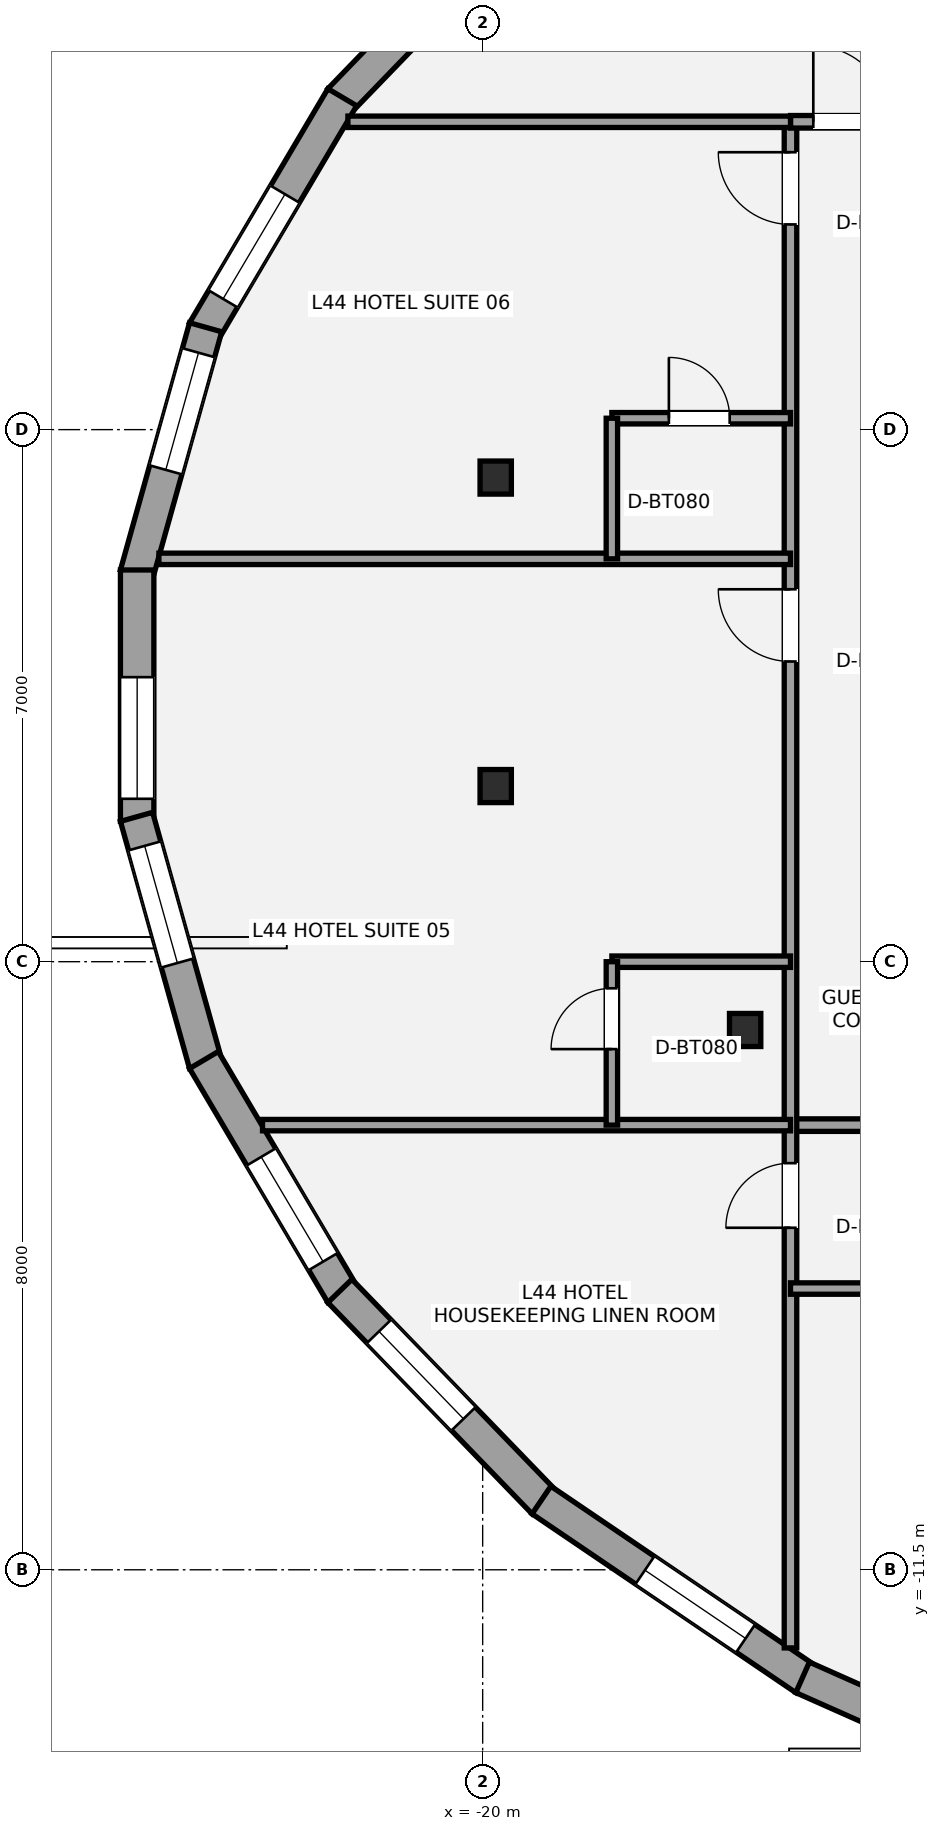
"""IFC4 building model, lengths in metres.
Left out: names, types, materials, properties, quantities, classifications, styles, units other than length and angle.
Written with IfcOpenShell. Run it as: python <this file> out.ifc"""

import sys

from ifc_helpers import new_model, si_unit, direction, frame, frame_2d, origin, origin_2d, place, context, subcontext, project, spatial, rectangle, i_section, extrude, element, fill, save


model = new_model("IFC4")
c1 = context("Model", 3, precision=1e-05, world=origin(), true_north=direction((0.0, 1.0)))
c2 = subcontext(c1, "Body", "Model", "MODEL_VIEW")
j1 = project(units=[si_unit("LENGTHUNIT", "METRE"), si_unit("PLANEANGLEUNIT", "RADIAN")], contexts=[c1])
p1 = place(None, origin())
s1 = spatial("IfcSite", under=j1, at=p1, CompositionType="ELEMENT")
p2 = place(p1, origin())
s2 = spatial("IfcBuilding", under=s1, at=p2, CompositionType="ELEMENT")
p3 = place(p2, frame((0.0, 0.0, 163.0)))
s3 = spatial("IfcBuildingStorey", under=s2, at=p3, CompositionType="ELEMENT", Elevation=163.0)
for number, where, z_axis, x_axis in (
    (1, (-19.828, 2.869, 0.0), (0.0, 0.0, 1.0), (1.0, 0.0, 0.0)),
    (2, (-19.828, -1.189, 0.0), (0.0, 0.0, 1.0), (1.0, 0.0, 0.0)),
    (3, (-16.547, -4.398, 0.0), (0.0, 0.0, 1.0), (1.0, 0.0, 0.0)),
):
    element("IfcColumn", number, at=place(p3, frame(where, z_axis=z_axis, x_axis=x_axis)), inside=s3, PredefinedType="COLUMN", context=c2, shape_type="SweptSolid", body=[
        extrude(i_section(OverallWidth=0.412, OverallDepth=0.435, WebThickness=0.036, FlangeThickness=0.057, at=origin_2d()), origin(), (0.0, 0.0, 1.0), 3.2),
    ])
p4 = place(p3, frame((-21.879, 7.832, 0.0), z_axis=(0.0, 0.0, 1.0), x_axis=(0.694975307772, 0.719033602544, 0.0)))
e4 = element("IfcWall", 4, at=p4, inside=s3, PredefinedType="STANDARD", context=c2, shape_type="SweptSolid", body=[
    extrude(rectangle(XDim=3.866, YDim=0.44, at=frame_2d((1.933, 0.0))), origin(), (0.0, 0.0, 1.0), 2.315),
])
p5 = place(p4, frame((1.526, 0.0, 0.58)))
e5 = element("IfcOpeningElement", 5, at=p5, cuts=e4, PredefinedType="OPENING", context=c2, shape_type="SweptSolid", body=[
    extrude(rectangle(XDim=1.6, YDim=1.55, at=frame_2d((0.8, 0.775))), frame((0.0, 0.23, 0.0), z_axis=(0.0, -1.0, 0.0), x_axis=(1.0, 0.0, 0.0)), (0.0, 0.0, 1.0), 0.46),
])
p6 = place(p3, frame((-23.667, 4.794, 0.0), z_axis=(0.0, 0.0, 1.0), x_axis=(0.508883387051, 0.860835465338, 0.0)))
e6 = element("IfcWall", 6, at=p6, inside=s3, PredefinedType="STANDARD", context=c2, shape_type="SweptSolid", body=[
    extrude(rectangle(XDim=3.577, YDim=0.44, at=frame_2d((1.788, 0.0))), origin(), (0.0, 0.0, 1.0), 2.315),
])
p7 = place(p6, frame((0.496, 0.0, 0.58)))
e7 = element("IfcOpeningElement", 7, at=p7, cuts=e6, PredefinedType="OPENING", context=c2, shape_type="SweptSolid", body=[
    extrude(rectangle(XDim=1.6, YDim=1.55, at=frame_2d((0.8, 0.775))), frame((0.0, 0.23, 0.0), z_axis=(0.0, -1.0, 0.0), x_axis=(1.0, 0.0, 0.0)), (0.0, 0.0, 1.0), 0.46),
])
p8 = place(p3, frame((-24.554, 1.594, 0.0), z_axis=(0.0, 0.0, 1.0), x_axis=(0.269235699479, 0.963074315993, 0.0)))
e8 = element("IfcWall", 8, at=p8, inside=s3, PredefinedType="STANDARD", context=c2, shape_type="SweptSolid", body=[
    extrude(rectangle(XDim=3.377, YDim=0.44, at=frame_2d((1.688, 0.0))), origin(), (0.0, 0.0, 1.0), 2.315),
])
p9 = place(p8, frame((1.429, 0.0, 0.58)))
e9 = element("IfcOpeningElement", 9, at=p9, cuts=e8, PredefinedType="OPENING", context=c2, shape_type="SweptSolid", body=[
    extrude(rectangle(XDim=1.6, YDim=1.55, at=frame_2d((0.8, 0.775))), frame((0.0, 0.23, 0.0), z_axis=(0.0, -1.0, 0.0), x_axis=(1.0, 0.0, 0.0)), (0.0, 0.0, 1.0), 0.46),
])
p10 = place(p3, frame((-24.546, -1.654, 0.0), z_axis=(0.0, 0.0, 1.0), x_axis=(0.0, 1.0, 0.0)))
e10 = element("IfcWall", 10, at=p10, inside=s3, PredefinedType="STANDARD", context=c2, shape_type="SweptSolid", body=[
    extrude(rectangle(XDim=3.307, YDim=0.44, at=frame_2d((1.654, 0.0))), origin(), (0.0, 0.0, 1.0), 2.315),
])
p11 = place(p10, frame((0.297, 0.0, 0.58)))
e11 = element("IfcOpeningElement", 11, at=p11, cuts=e10, PredefinedType="OPENING", context=c2, shape_type="SweptSolid", body=[
    extrude(rectangle(XDim=1.6, YDim=1.55, at=frame_2d((0.8, 0.775))), frame((0.0, 0.23, 0.0), z_axis=(0.0, -1.0, 0.0), x_axis=(1.0, 0.0, 0.0)), (0.0, 0.0, 1.0), 0.46),
])
p12 = place(p3, frame((-23.645, -4.846, 0.0), z_axis=(0.0, 0.0, 1.0), x_axis=(-0.269235699479, 0.963074315993, 0.0)))
e12 = element("IfcWall", 12, at=p12, inside=s3, PredefinedType="STANDARD", context=c2, shape_type="SweptSolid", body=[
    extrude(rectangle(XDim=3.377, YDim=0.44, at=frame_2d((1.688, 0.0))), origin(), (0.0, 0.0, 1.0), 2.315),
])
p13 = place(p12, frame((1.38, 0.0, 0.58)))
e13 = element("IfcOpeningElement", 13, at=p13, cuts=e12, PredefinedType="OPENING", context=c2, shape_type="SweptSolid", body=[
    extrude(rectangle(XDim=1.6, YDim=1.55, at=frame_2d((0.8, 0.775))), frame((0.0, 0.23, 0.0), z_axis=(0.0, -1.0, 0.0), x_axis=(1.0, 0.0, 0.0)), (0.0, 0.0, 1.0), 0.46),
])
p14 = place(p3, frame((-21.847, -7.873, 0.0), z_axis=(0.0, 0.0, 1.0), x_axis=(-0.508883387051, 0.860835465338, 0.0)))
e14 = element("IfcWall", 14, at=p14, inside=s3, PredefinedType="STANDARD", context=c2, shape_type="SweptSolid", body=[
    extrude(rectangle(XDim=3.577, YDim=0.44, at=frame_2d((1.788, 0.0))), origin(), (0.0, 0.0, 1.0), 2.315),
])
p15 = place(p14, frame((0.496, 0.0, 0.58)))
e15 = element("IfcOpeningElement", 15, at=p15, cuts=e14, PredefinedType="OPENING", context=c2, shape_type="SweptSolid", body=[
    extrude(rectangle(XDim=1.6, YDim=1.55, at=frame_2d((0.8, 0.775))), frame((0.0, 0.23, 0.0), z_axis=(0.0, -1.0, 0.0), x_axis=(1.0, 0.0, 0.0)), (0.0, 0.0, 1.0), 0.46),
])
p16 = place(p3, frame((-19.192, -10.612, 0.0), z_axis=(0.0, 0.0, 1.0), x_axis=(-0.694975307772, 0.719033602544, 0.0)))
e16 = element("IfcWall", 16, at=p16, inside=s3, PredefinedType="STANDARD", context=c2, shape_type="SweptSolid", body=[
    extrude(rectangle(XDim=3.866, YDim=0.44, at=frame_2d((1.933, 0.0))), origin(), (0.0, 0.0, 1.0), 2.315),
])
p17 = place(p16, frame((1.526, 0.0, 0.58)))
e17 = element("IfcOpeningElement", 17, at=p17, cuts=e16, PredefinedType="OPENING", context=c2, shape_type="SweptSolid", body=[
    extrude(rectangle(XDim=1.6, YDim=1.55, at=frame_2d((0.8, 0.775))), frame((0.0, 0.23, 0.0), z_axis=(0.0, -1.0, 0.0), x_axis=(1.0, 0.0, 0.0)), (0.0, 0.0, 1.0), 0.46),
])
p18 = place(p3, frame((-15.757, -12.935, 0.0), z_axis=(0.0, 0.0, 1.0), x_axis=(-0.827760762475, 0.561081206338, 0.0)))
e18 = element("IfcWall", 18, at=p18, inside=s3, PredefinedType="STANDARD", context=c2, shape_type="SweptSolid", body=[
    extrude(rectangle(XDim=4.192, YDim=0.44, at=frame_2d((2.096, 0.0))), origin(), (0.0, 0.0, 1.0), 2.315),
])
p19 = place(p18, frame((0.947, 0.0, 0.58)))
e19 = element("IfcOpeningElement", 19, at=p19, cuts=e18, PredefinedType="OPENING", context=c2, shape_type="SweptSolid", body=[
    extrude(rectangle(XDim=1.6, YDim=1.55, at=frame_2d((0.8, 0.775))), frame((0.0, 0.23, 0.0), z_axis=(0.0, -1.0, 0.0), x_axis=(1.0, 0.0, 0.0)), (0.0, 0.0, 1.0), 0.46),
])
p20 = place(p3, frame((-11.69, -14.737, 0.0), z_axis=(0.0, 0.0, 1.0), x_axis=(-0.913907994914, 0.405921392431, 0.0)))
e20 = element("IfcWall", 20, at=p20, inside=s3, PredefinedType="STANDARD", context=c2, shape_type="SweptSolid", body=[
    extrude(rectangle(XDim=4.487, YDim=0.44, at=frame_2d((2.244, 0.0))), origin(), (0.0, 0.0, 1.0), 2.315),
])
p21 = place(p20, frame((1.692, 0.0, 0.58)))
e21 = element("IfcOpeningElement", 21, at=p21, cuts=e20, PredefinedType="OPENING", context=c2, shape_type="SweptSolid", body=[
    extrude(rectangle(XDim=1.6, YDim=1.55, at=frame_2d((0.8, 0.775))), frame((0.0, 0.23, 0.0), z_axis=(0.0, -1.0, 0.0), x_axis=(1.0, 0.0, 0.0)), (0.0, 0.0, 1.0), 0.46),
])
p22 = place(p3, frame((-15.95, -5.65, 0.0), z_axis=(0.0, 0.0, 1.0), x_axis=(1.0, 0.0, 0.0)))
e22 = element("IfcWall", 22, at=p22, inside=s3, PredefinedType="PARTITIONING", context=c2, shape_type="SweptSolid", body=[
    extrude(rectangle(XDim=31.5, YDim=0.165, at=frame_2d((15.75, 0.0))), origin(), (0.0, 0.0, 1.0), 2.398),
])
p23 = place(p22, frame((4.8, 0.0, 0.0)))
e23 = element("IfcOpeningElement", 23, at=p23, cuts=e22, PredefinedType="OPENING", context=c2, shape_type="SweptSolid", body=[
    extrude(rectangle(XDim=0.95, YDim=2.15, at=frame_2d((0.475, 1.075))), frame((0.0, 0.093, 0.0), z_axis=(0.0, -1.0, 0.0), x_axis=(1.0, 0.0, 0.0)), (0.0, 0.0, 1.0), 0.185),
])
p24 = place(p22, frame((12.8, 0.0, 0.0)))
e24 = element("IfcOpeningElement", 24, at=p24, cuts=e22, PredefinedType="OPENING", context=c2, shape_type="SweptSolid", body=[
    extrude(rectangle(XDim=0.95, YDim=2.15, at=frame_2d((0.475, 1.075))), frame((0.0, 0.093, 0.0), z_axis=(0.0, -1.0, 0.0), x_axis=(1.0, 0.0, 0.0)), (0.0, 0.0, 1.0), 0.185),
])
p25 = place(p22, frame((20.8, 0.0, 0.0)))
e25 = element("IfcOpeningElement", 25, at=p25, cuts=e22, PredefinedType="OPENING", context=c2, shape_type="SweptSolid", body=[
    extrude(rectangle(XDim=0.95, YDim=2.15, at=frame_2d((0.475, 1.075))), frame((0.0, 0.093, 0.0), z_axis=(0.0, -1.0, 0.0), x_axis=(1.0, 0.0, 0.0)), (0.0, 0.0, 1.0), 0.185),
])
p26 = place(p22, frame((30.15, 0.0, 0.0)))
e26 = element("IfcOpeningElement", 26, at=p26, cuts=e22, PredefinedType="OPENING", context=c2, shape_type="SweptSolid", body=[
    extrude(rectangle(XDim=0.95, YDim=2.15, at=frame_2d((0.475, 1.075))), frame((0.0, 0.093, 0.0), z_axis=(0.0, -1.0, 0.0), x_axis=(1.0, 0.0, 0.0)), (0.0, 0.0, 1.0), 0.185),
])
p27 = place(p3, frame((-15.95, -12.528, 0.0), z_axis=(0.0, 0.0, 1.0), x_axis=(0.0, 1.0, 0.0)))
e27 = element("IfcWall", 27, at=p27, inside=s3, PredefinedType="PARTITIONING", context=c2, shape_type="SweptSolid", body=[
    extrude(rectangle(XDim=20.078, YDim=0.165, at=frame_2d((10.039, 0.0))), origin(), (0.0, 0.0, 1.0), 2.473),
])
p28 = place(p27, frame((5.528, 0.0, 0.0)))
e28 = element("IfcOpeningElement", 28, at=p28, cuts=e27, PredefinedType="OPENING", context=c2, shape_type="SweptSolid", body=[
    extrude(rectangle(XDim=0.85, YDim=2.1, at=frame_2d((0.425, 1.05))), frame((0.0, 0.093, 0.0), z_axis=(0.0, -1.0, 0.0), x_axis=(1.0, 0.0, 0.0)), (0.0, 0.0, 1.0), 0.185),
])
p29 = place(p27, frame((12.978, 0.0, 0.0)))
e29 = element("IfcOpeningElement", 29, at=p29, cuts=e27, PredefinedType="OPENING", context=c2, shape_type="SweptSolid", body=[
    extrude(rectangle(XDim=0.95, YDim=2.15, at=frame_2d((0.475, 1.075))), frame((0.0, 0.093, 0.0), z_axis=(0.0, -1.0, 0.0), x_axis=(1.0, 0.0, 0.0)), (0.0, 0.0, 1.0), 0.185),
])
p30 = place(p27, frame((18.728, 0.0, 0.0)))
e30 = element("IfcOpeningElement", 30, at=p30, cuts=e27, PredefinedType="OPENING", context=c2, shape_type="SweptSolid", body=[
    extrude(rectangle(XDim=0.95, YDim=2.15, at=frame_2d((0.475, 1.075))), frame((0.0, 0.093, 0.0), z_axis=(0.0, -1.0, 0.0), x_axis=(1.0, 0.0, 0.0)), (0.0, 0.0, 1.0), 0.185),
])
p31 = place(p3, frame((-15.95, 7.55, 0.0), z_axis=(0.0, 0.0, 1.0), x_axis=(1.0, 0.0, 0.0)))
e31 = element("IfcWall", 31, at=p31, inside=s3, PredefinedType="PARTITIONING", context=c2, shape_type="SweptSolid", body=[
    extrude(rectangle(XDim=2.15, YDim=0.165, at=frame_2d((1.075, 0.0))), origin(), (0.0, 0.0, 1.0), 3.02),
])
p32 = place(p31, frame((0.3, 0.0, 0.0)))
e32 = element("IfcOpeningElement", 32, at=p32, cuts=e31, PredefinedType="OPENING", context=c2, shape_type="SweptSolid", body=[
    extrude(rectangle(XDim=1.0, YDim=2.15, at=frame_2d((0.5, 1.075))), frame((0.0, 0.093, 0.0), z_axis=(0.0, -1.0, 0.0), x_axis=(1.0, 0.0, 0.0)), (0.0, 0.0, 1.0), 0.185),
])
p33 = place(p3, frame((-21.773, 7.55, 0.0), z_axis=(0.0, 0.0, 1.0), x_axis=(1.0, 0.0, 0.0)))
e33 = element("IfcWall", 33, at=p33, inside=s3, PredefinedType="PLUMBINGWALL", context=c2, shape_type="SweptSolid", body=[
    extrude(rectangle(XDim=5.823, YDim=0.15, at=frame_2d((2.912, 0.0))), origin(), (0.0, 0.0, 1.0), 2.473),
])
p34 = place(p3, frame((-22.896, -5.65, 0.0), z_axis=(0.0, 0.0, 1.0), x_axis=(1.0, 0.0, 0.0)))
e34 = element("IfcWall", 34, at=p34, inside=s3, PredefinedType="PLUMBINGWALL", context=c2, shape_type="SweptSolid", body=[
    extrude(rectangle(XDim=6.947, YDim=0.15, at=frame_2d((3.473, 0.0))), origin(), (0.0, 0.0, 1.0), 2.473),
])
p35 = place(p3, frame((-15.95, -7.8, 0.0), z_axis=(0.0, 0.0, 1.0), x_axis=(1.0, 0.0, 0.0)))
e35 = element("IfcWall", 35, at=p35, inside=s3, PredefinedType="PLUMBINGWALL", context=c2, shape_type="SweptSolid", body=[
    extrude(rectangle(XDim=1.85, YDim=0.15, at=frame_2d((0.925, 0.0))), origin(), (0.0, 0.0, 1.0), 3.02),
])
p36 = place(p3, frame((-24.26, 1.8, 0.0), z_axis=(0.0, 0.0, 1.0), x_axis=(1.0, 0.0, 0.0)))
e36 = element("IfcWall", 36, at=p36, inside=s3, PredefinedType="PLUMBINGWALL", context=c2, shape_type="SweptSolid", body=[
    extrude(rectangle(XDim=8.31, YDim=0.15, at=frame_2d((4.155, 0.0))), origin(), (0.0, 0.0, 1.0), 2.473),
])
p37 = place(p3, frame((-18.3, -3.5, 0.0), z_axis=(0.0, 0.0, 1.0), x_axis=(1.0, 0.0, 0.0)))
e37 = element("IfcWall", 37, at=p37, inside=s3, PredefinedType="PLUMBINGWALL", context=c2, shape_type="SweptSolid", body=[
    extrude(rectangle(XDim=2.35, YDim=0.15, at=frame_2d((1.175, 0.0))), origin(), (0.0, 0.0, 1.0), 2.398),
])
p38 = place(p3, frame((-18.3, -5.65, 0.0), z_axis=(0.0, 0.0, 1.0), x_axis=(0.0, 1.0, 0.0)))
e38 = element("IfcWall", 38, at=p38, inside=s3, PredefinedType="PLUMBINGWALL", context=c2, shape_type="SweptSolid", body=[
    extrude(rectangle(XDim=2.15, YDim=0.15, at=frame_2d((1.075, 0.0))), origin(), (0.0, 0.0, 1.0), 2.473),
])
p39 = place(p38, frame((1.0, 0.0, 0.0)))
e39 = element("IfcOpeningElement", 39, at=p39, cuts=e38, PredefinedType="OPENING", context=c2, shape_type="SweptSolid", body=[
    extrude(rectangle(XDim=0.8, YDim=2.1, at=frame_2d((0.4, 1.05))), frame((0.0, 0.085, 0.0), z_axis=(0.0, -1.0, 0.0), x_axis=(1.0, 0.0, 0.0)), (0.0, 0.0, 1.0), 0.17),
])
p40 = place(p3, frame((-18.3, 3.65, 0.0), z_axis=(0.0, 0.0, 1.0), x_axis=(1.0, 0.0, 0.0)))
e40 = element("IfcWall", 40, at=p40, inside=s3, PredefinedType="PLUMBINGWALL", context=c2, shape_type="SweptSolid", body=[
    extrude(rectangle(XDim=2.35, YDim=0.15, at=frame_2d((1.175, 0.0))), origin(), (0.0, 0.0, 1.0), 3.02),
])
p41 = place(p40, frame((0.75, 0.0, 0.0)))
e41 = element("IfcOpeningElement", 41, at=p41, cuts=e40, PredefinedType="OPENING", context=c2, shape_type="SweptSolid", body=[
    extrude(rectangle(XDim=0.8, YDim=2.1, at=frame_2d((0.4, 1.05))), frame((0.0, 0.085, 0.0), z_axis=(0.0, -1.0, 0.0), x_axis=(1.0, 0.0, 0.0)), (0.0, 0.0, 1.0), 0.17),
])
p42 = place(p3, frame((-18.3, 1.8, 0.0), z_axis=(0.0, 0.0, 1.0), x_axis=(0.0, 1.0, 0.0)))
e42 = element("IfcWall", 42, at=p42, inside=s3, PredefinedType="PLUMBINGWALL", context=c2, shape_type="SweptSolid", body=[
    extrude(rectangle(XDim=1.85, YDim=0.15, at=frame_2d((0.925, 0.0))), origin(), (0.0, 0.0, 1.0), 3.02),
])
p43 = place(p7, origin())
e43 = element("IfcWindow", 43, at=p43, inside=s3, PartitioningType="SINGLE_PANEL", PredefinedType="WINDOW", context=c2, shape_type="SweptSolid", body=[
    extrude(rectangle(XDim=1.6, YDim=1.55, at=frame_2d((0.8, 0.775))), frame((0.0, -0.01, 0.0), z_axis=(0.0, -1.0, 0.0), x_axis=(1.0, 0.0, 0.0)), (0.0, 0.0, 1.0), 0.06),
])
fill(e7, e43)
p44 = place(p9, origin())
e44 = element("IfcWindow", 44, at=p44, inside=s3, PartitioningType="SINGLE_PANEL", PredefinedType="WINDOW", context=c2, shape_type="SweptSolid", body=[
    extrude(rectangle(XDim=1.6, YDim=1.55, at=frame_2d((0.8, 0.775))), frame((0.0, -0.01, 0.0), z_axis=(0.0, -1.0, 0.0), x_axis=(1.0, 0.0, 0.0)), (0.0, 0.0, 1.0), 0.06),
])
fill(e9, e44)
p45 = place(p11, origin())
e45 = element("IfcWindow", 45, at=p45, inside=s3, PartitioningType="SINGLE_PANEL", PredefinedType="WINDOW", context=c2, shape_type="SweptSolid", body=[
    extrude(rectangle(XDim=1.6, YDim=1.55, at=frame_2d((0.8, 0.775))), frame((0.0, -0.01, 0.0), z_axis=(0.0, -1.0, 0.0), x_axis=(1.0, 0.0, 0.0)), (0.0, 0.0, 1.0), 0.06),
])
fill(e11, e45)
p46 = place(p13, origin())
e46 = element("IfcWindow", 46, at=p46, inside=s3, PartitioningType="SINGLE_PANEL", PredefinedType="WINDOW", context=c2, shape_type="SweptSolid", body=[
    extrude(rectangle(XDim=1.6, YDim=1.55, at=frame_2d((0.8, 0.775))), frame((0.0, -0.01, 0.0), z_axis=(0.0, -1.0, 0.0), x_axis=(1.0, 0.0, 0.0)), (0.0, 0.0, 1.0), 0.06),
])
fill(e13, e46)
p47 = place(p15, origin())
e47 = element("IfcWindow", 47, at=p47, inside=s3, PartitioningType="SINGLE_PANEL", PredefinedType="WINDOW", context=c2, shape_type="SweptSolid", body=[
    extrude(rectangle(XDim=1.6, YDim=1.55, at=frame_2d((0.8, 0.775))), frame((0.0, -0.01, 0.0), z_axis=(0.0, -1.0, 0.0), x_axis=(1.0, 0.0, 0.0)), (0.0, 0.0, 1.0), 0.06),
])
fill(e15, e47)
p48 = place(p17, origin())
e48 = element("IfcWindow", 48, at=p48, inside=s3, PartitioningType="SINGLE_PANEL", PredefinedType="WINDOW", context=c2, shape_type="SweptSolid", body=[
    extrude(rectangle(XDim=1.6, YDim=1.55, at=frame_2d((0.8, 0.775))), frame((0.0, -0.01, 0.0), z_axis=(0.0, -1.0, 0.0), x_axis=(1.0, 0.0, 0.0)), (0.0, 0.0, 1.0), 0.06),
])
fill(e17, e48)
p49 = place(p19, origin())
e49 = element("IfcWindow", 49, at=p49, inside=s3, PartitioningType="SINGLE_PANEL", PredefinedType="WINDOW", context=c2, shape_type="SweptSolid", body=[
    extrude(rectangle(XDim=1.6, YDim=1.55, at=frame_2d((0.8, 0.775))), frame((0.0, -0.01, 0.0), z_axis=(0.0, -1.0, 0.0), x_axis=(1.0, 0.0, 0.0)), (0.0, 0.0, 1.0), 0.06),
])
fill(e19, e49)
p50 = place(p32, origin())
e50 = element("IfcDoor", 50, at=p50, inside=s3, OperationType="SINGLE_SWING_LEFT", PredefinedType="DOOR", context=c2, shape_type="SweptSolid", body=[
    extrude(rectangle(XDim=1.0, YDim=2.15, at=frame_2d((0.5, 1.075))), frame((0.0, 0.025, 0.0), z_axis=(0.0, -1.0, 0.0), x_axis=(1.0, 0.0, 0.0)), (0.0, 0.0, 1.0), 0.05),
])
fill(e32, e50)
p51 = place(p28, origin())
e51 = element("IfcDoor", 51, at=p51, inside=s3, OperationType="SINGLE_SWING_LEFT", PredefinedType="DOOR", context=c2, shape_type="SweptSolid", body=[
    extrude(rectangle(XDim=0.85, YDim=2.1, at=frame_2d((0.425, 1.05))), frame((0.0, 0.025, 0.0), z_axis=(0.0, -1.0, 0.0), x_axis=(1.0, 0.0, 0.0)), (0.0, 0.0, 1.0), 0.05),
])
fill(e28, e51)
p52 = place(p29, origin())
e52 = element("IfcDoor", 52, at=p52, inside=s3, OperationType="SINGLE_SWING_RIGHT", PredefinedType="DOOR", context=c2, shape_type="SweptSolid", body=[
    extrude(rectangle(XDim=0.95, YDim=2.15, at=frame_2d((0.475, 1.075))), frame((0.0, 0.025, 0.0), z_axis=(0.0, -1.0, 0.0), x_axis=(1.0, 0.0, 0.0)), (0.0, 0.0, 1.0), 0.05),
])
fill(e29, e52)
p53 = place(p39, origin())
e53 = element("IfcDoor", 53, at=p53, inside=s3, OperationType="SINGLE_SWING_LEFT", PredefinedType="DOOR", context=c2, shape_type="SweptSolid", body=[
    extrude(rectangle(XDim=0.8, YDim=2.1, at=frame_2d((0.4, 1.05))), frame((0.0, 0.025, 0.0), z_axis=(0.0, -1.0, 0.0), x_axis=(1.0, 0.0, 0.0)), (0.0, 0.0, 1.0), 0.05),
])
fill(e39, e53)
p54 = place(p30, origin())
e54 = element("IfcDoor", 54, at=p54, inside=s3, OperationType="SINGLE_SWING_RIGHT", PredefinedType="DOOR", context=c2, shape_type="SweptSolid", body=[
    extrude(rectangle(XDim=0.95, YDim=2.15, at=frame_2d((0.475, 1.075))), frame((0.0, 0.025, 0.0), z_axis=(0.0, -1.0, 0.0), x_axis=(1.0, 0.0, 0.0)), (0.0, 0.0, 1.0), 0.05),
])
fill(e30, e54)
p55 = place(p41, origin())
e55 = element("IfcDoor", 55, at=p55, inside=s3, OperationType="SINGLE_SWING_LEFT", PredefinedType="DOOR", context=c2, shape_type="SweptSolid", body=[
    extrude(rectangle(XDim=0.8, YDim=2.1, at=frame_2d((0.4, 1.05))), frame((0.0, 0.025, 0.0), z_axis=(0.0, -1.0, 0.0), x_axis=(1.0, 0.0, 0.0)), (0.0, 0.0, 1.0), 0.05),
])
fill(e41, e55)
save(model, sys.argv[1])
